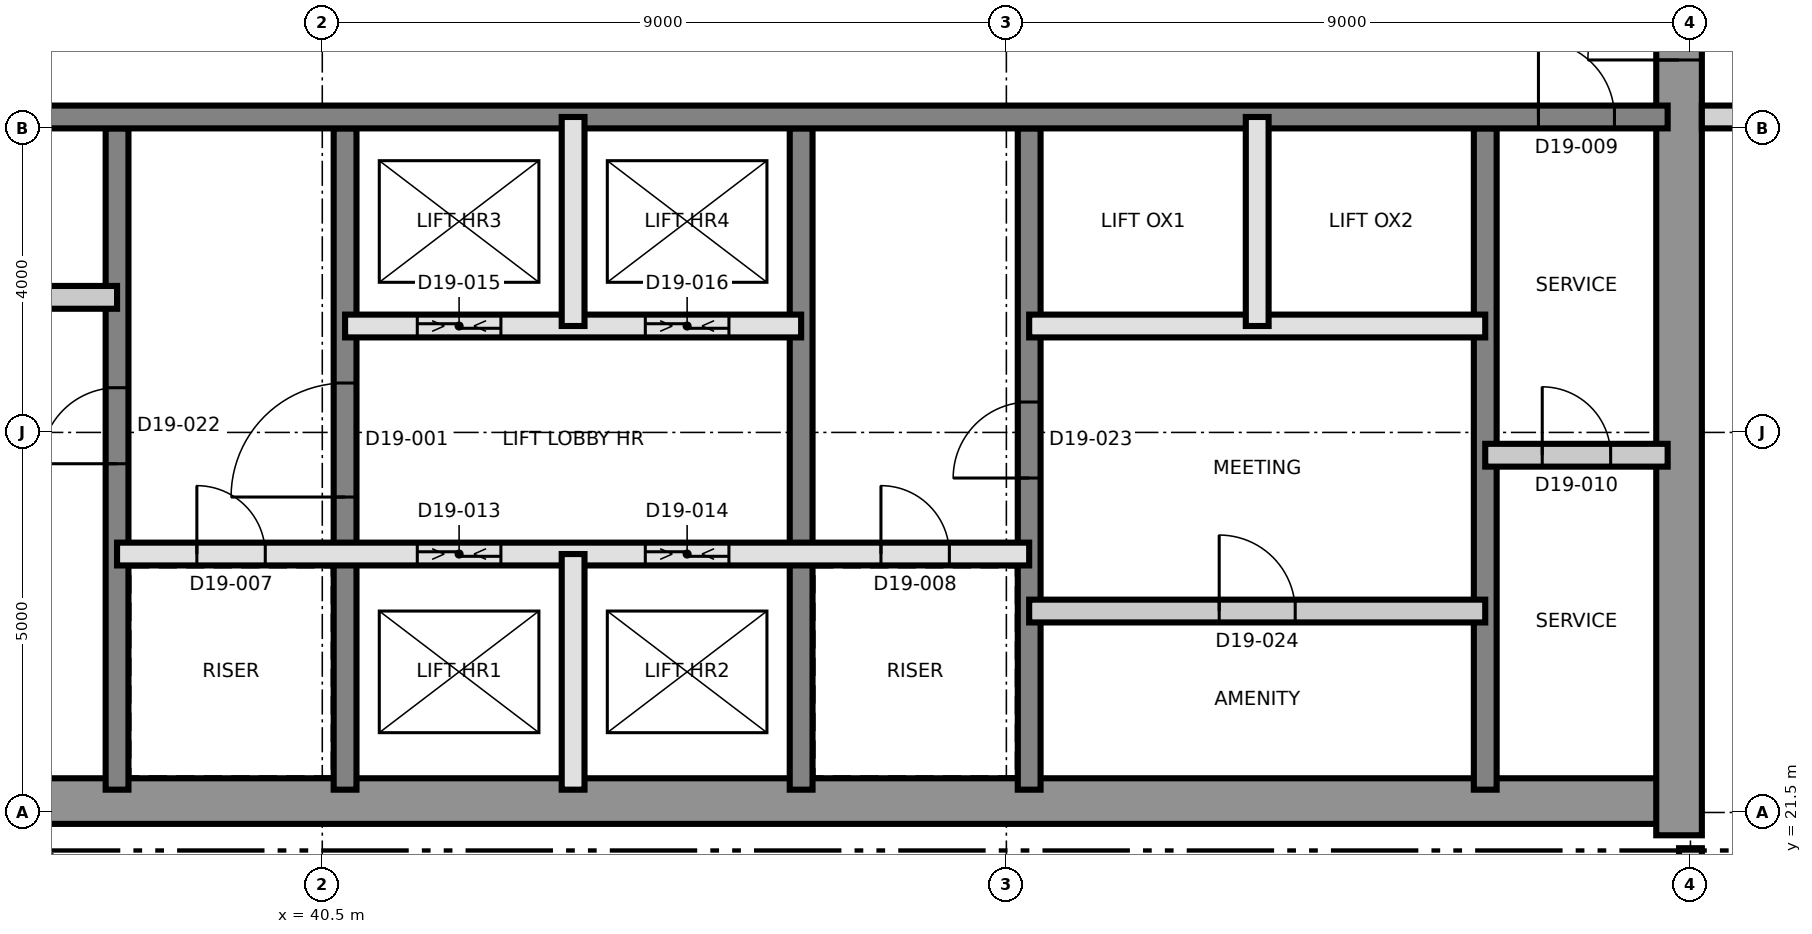
"""IFC4 building model, lengths in metres.
Left out: names, types, materials, properties, quantities, classifications, styles, units other than length and angle.
Written with IfcOpenShell. Run it as: python <this file> out.ifc"""

import sys

from ifc_helpers import new_model, si_unit, direction, frame, frame_2d, origin, place, context, subcontext, project, spatial, rectangle, extrude, element, fill, save


model = new_model("IFC4")
c1 = context("Model", 3, precision=1e-05, world=origin(), true_north=direction((0.0, 1.0)))
c2 = subcontext(c1, "Body", "Model", "MODEL_VIEW")
j1 = project(units=[si_unit("LENGTHUNIT", "METRE"), si_unit("PLANEANGLEUNIT", "RADIAN")], contexts=[c1])
p1 = place(None, origin())
s1 = spatial("IfcSite", under=j1, at=p1, CompositionType="ELEMENT")
p2 = place(p1, origin())
s2 = spatial("IfcBuilding", under=s1, at=p2, CompositionType="ELEMENT")
p3 = place(p2, frame((0.0, 0.0, 179.2)))
s3 = spatial("IfcBuildingStorey", under=s2, at=p3, CompositionType="ELEMENT", Elevation=179.2)
p4 = place(p3, frame((31.2, 21.65, 0.0), z_axis=(0.0, 0.0, 1.0), x_axis=(1.0, 0.0, 0.0)))
e1 = element("IfcWall", 1, at=p4, inside=s3, PredefinedType="SHEAR", context=c2, shape_type="SweptSolid", body=[
    extrude(rectangle(XDim=27.0, YDim=0.6, at=frame_2d((13.5, 0.0))), origin(), (0.0, 0.0, 1.0), 3.7),
])
p5 = place(p3, frame((58.35, 21.2, 0.0), z_axis=(0.0, 0.0, 1.0), x_axis=(0.0, 1.0, 0.0)))
e2 = element("IfcWall", 2, at=p5, inside=s3, PredefinedType="SHEAR", context=c2, shape_type="SweptSolid", body=[
    extrude(rectangle(XDim=18.6, YDim=0.6, at=frame_2d((9.3, 0.0))), origin(), (0.0, 0.0, 1.0), 3.7),
])
p6 = place(p5, frame((10.2, 0.0, 0.0)))
e3 = element("IfcOpeningElement", 3, at=p6, cuts=e2, PredefinedType="OPENING", context=c2, shape_type="SweptSolid", body=[
    extrude(rectangle(XDim=1.2, YDim=2.1, at=frame_2d((0.6, 1.05))), frame((0.0, 0.31, 0.0), z_axis=(0.0, -1.0, 0.0), x_axis=(1.0, 0.0, 0.0)), (0.0, 0.0, 1.0), 0.62),
])
p7 = place(p3, frame((37.8, 21.8, 0.0), z_axis=(0.0, 0.0, 1.0), x_axis=(0.0, 1.0, 0.0)))
e4 = element("IfcWall", 4, at=p7, inside=s3, PredefinedType="SHEAR", context=c2, shape_type="SweptSolid", body=[
    extrude(rectangle(XDim=8.7, YDim=0.3, at=frame_2d((4.35, 0.0))), origin(), (0.0, 0.0, 1.0), 3.7),
])
p8 = place(p7, frame((4.288, 0.0, 0.0)))
e5 = element("IfcOpeningElement", 5, at=p8, cuts=e4, PredefinedType="OPENING", context=c2, shape_type="SweptSolid", body=[
    extrude(rectangle(XDim=1.0, YDim=2.1, at=frame_2d((0.5, 1.05))), frame((0.0, 0.16, 0.0), z_axis=(0.0, -1.0, 0.0), x_axis=(1.0, 0.0, 0.0)), (0.0, 0.0, 1.0), 0.32),
])
p9 = place(p3, frame((40.8, 21.8, 0.0), z_axis=(0.0, 0.0, 1.0), x_axis=(0.0, 1.0, 0.0)))
e6 = element("IfcWall", 6, at=p9, inside=s3, PredefinedType="SHEAR", context=c2, shape_type="SweptSolid", body=[
    extrude(rectangle(XDim=8.7, YDim=0.3, at=frame_2d((4.35, 0.0))), origin(), (0.0, 0.0, 1.0), 3.7),
])
p10 = place(p9, frame((3.85, 0.0, 0.0)))
e7 = element("IfcOpeningElement", 7, at=p10, cuts=e6, PredefinedType="OPENING", context=c2, shape_type="SweptSolid", body=[
    extrude(rectangle(XDim=1.5, YDim=2.1, at=frame_2d((0.75, 1.05))), frame((0.0, 0.16, 0.0), z_axis=(0.0, -1.0, 0.0), x_axis=(1.0, 0.0, 0.0)), (0.0, 0.0, 1.0), 0.32),
])
p11 = place(p3, frame((46.8, 21.8, 0.0), z_axis=(0.0, 0.0, 1.0), x_axis=(0.0, 1.0, 0.0)))
e8 = element("IfcWall", 8, at=p11, inside=s3, PredefinedType="SHEAR", context=c2, shape_type="SweptSolid", body=[
    extrude(rectangle(XDim=8.7, YDim=0.3, at=frame_2d((4.35, 0.0))), origin(), (0.0, 0.0, 1.0), 3.7),
])
p12 = place(p3, frame((49.8, 21.8, 0.0), z_axis=(0.0, 0.0, 1.0), x_axis=(0.0, 1.0, 0.0)))
e9 = element("IfcWall", 9, at=p12, inside=s3, PredefinedType="SHEAR", context=c2, shape_type="SweptSolid", body=[
    extrude(rectangle(XDim=8.7, YDim=0.3, at=frame_2d((4.35, 0.0))), origin(), (0.0, 0.0, 1.0), 3.7),
])
p13 = place(p12, frame((4.1, 0.0, 0.0)))
e10 = element("IfcOpeningElement", 10, at=p13, cuts=e9, PredefinedType="OPENING", context=c2, shape_type="SweptSolid", body=[
    extrude(rectangle(XDim=1.0, YDim=2.1, at=frame_2d((0.5, 1.05))), frame((0.0, 0.16, 0.0), z_axis=(0.0, -1.0, 0.0), x_axis=(1.0, 0.0, 0.0)), (0.0, 0.0, 1.0), 0.32),
])
p14 = place(p3, frame((55.8, 21.8, 0.0), z_axis=(0.0, 0.0, 1.0), x_axis=(0.0, 1.0, 0.0)))
e11 = element("IfcWall", 11, at=p14, inside=s3, PredefinedType="SHEAR", context=c2, shape_type="SweptSolid", body=[
    extrude(rectangle(XDim=8.7, YDim=0.3, at=frame_2d((4.35, 0.0))), origin(), (0.0, 0.0, 1.0), 3.7),
])
p15 = place(p3, frame((31.8, 30.65, 0.0), z_axis=(0.0, 0.0, 1.0), x_axis=(1.0, 0.0, 0.0)))
e12 = element("IfcWall", 12, at=p15, inside=s3, PredefinedType="SHEAR", context=c2, shape_type="SweptSolid", body=[
    extrude(rectangle(XDim=26.4, YDim=0.3, at=frame_2d((13.2, 0.0))), origin(), (0.0, 0.0, 1.0), 3.7),
])
p16 = place(p15, frame((24.7, 0.0, 0.0)))
e13 = element("IfcOpeningElement", 13, at=p16, cuts=e12, PredefinedType="OPENING", context=c2, shape_type="SweptSolid", body=[
    extrude(rectangle(XDim=1.0, YDim=2.1, at=frame_2d((0.5, 1.05))), frame((0.0, 0.16, 0.0), z_axis=(0.0, -1.0, 0.0), x_axis=(1.0, 0.0, 0.0)), (0.0, 0.0, 1.0), 0.32),
])
p17 = place(p15, frame((4.0, 0.0, 0.0)))
e14 = element("IfcOpeningElement", 14, at=p17, cuts=e12, PredefinedType="OPENING", context=c2, shape_type="SweptSolid", body=[
    extrude(rectangle(XDim=1.0, YDim=2.1, at=frame_2d((0.5, 1.05))), frame((0.0, 0.16, 0.0), z_axis=(0.0, -1.0, 0.0), x_axis=(1.0, 0.0, 0.0)), (0.0, 0.0, 1.0), 0.32),
])
p18 = place(p3, frame((36.788, 20.834, 0.0), z_axis=(0.0, 0.0, 1.0), x_axis=(0.896857753975, -0.442319080682, 0.0)))
e15 = element("IfcWall", 15, at=p18, inside=s3, PredefinedType="SOLIDWALL", context=c2, shape_type="SweptSolid", body=[
    extrude(rectangle(XDim=1.618, YDim=0.3, at=frame_2d((0.809, 0.0))), origin(), (0.0, 0.0, 1.0), 3.4),
])
p19 = place(p3, frame((49.8, 24.15, 0.0), z_axis=(0.0, 0.0, 1.0), x_axis=(1.0, 0.0, 0.0)))
e16 = element("IfcWall", 16, at=p19, inside=s3, PredefinedType="PARTITIONING", context=c2, shape_type="SweptSolid", body=[
    extrude(rectangle(XDim=6.0, YDim=0.3, at=frame_2d((3.0, 0.0))), origin(), (0.0, 0.0, 1.0), 3.4),
])
p20 = place(p19, frame((2.5, 0.0, 0.0)))
e17 = element("IfcOpeningElement", 17, at=p20, cuts=e16, PredefinedType="OPENING", context=c2, shape_type="SweptSolid", body=[
    extrude(rectangle(XDim=1.0, YDim=2.1, at=frame_2d((0.5, 1.05))), frame((0.0, 0.16, 0.0), z_axis=(0.0, -1.0, 0.0), x_axis=(1.0, 0.0, 0.0)), (0.0, 0.0, 1.0), 0.32),
])
p21 = place(p3, frame((37.8, 24.9, 0.0), z_axis=(0.0, 0.0, 1.0), x_axis=(1.0, 0.0, 0.0)))
e18 = element("IfcWall", 18, at=p21, inside=s3, PredefinedType="SOLIDWALL", context=c2, shape_type="SweptSolid", body=[
    extrude(rectangle(XDim=12.0, YDim=0.3, at=frame_2d((6.0, 0.0))), origin(), (0.0, 0.0, 1.0), 3.4),
])
p22 = place(p21, frame((1.05, 0.0, 0.0)))
e19 = element("IfcOpeningElement", 19, at=p22, cuts=e18, PredefinedType="OPENING", context=c2, shape_type="SweptSolid", body=[
    extrude(rectangle(XDim=0.9, YDim=2.1, at=frame_2d((0.45, 1.05))), frame((0.0, 0.16, 0.0), z_axis=(0.0, -1.0, 0.0), x_axis=(1.0, 0.0, 0.0)), (0.0, 0.0, 1.0), 0.32),
])
p23 = place(p21, frame((10.05, 0.0, 0.0)))
e20 = element("IfcOpeningElement", 20, at=p23, cuts=e18, PredefinedType="OPENING", context=c2, shape_type="SweptSolid", body=[
    extrude(rectangle(XDim=0.9, YDim=2.1, at=frame_2d((0.45, 1.05))), frame((0.0, 0.16, 0.0), z_axis=(0.0, -1.0, 0.0), x_axis=(1.0, 0.0, 0.0)), (0.0, 0.0, 1.0), 0.32),
])
p24 = place(p21, frame((3.95, 0.0, 0.0)))
e21 = element("IfcOpeningElement", 21, at=p24, cuts=e18, PredefinedType="OPENING", context=c2, shape_type="SweptSolid", body=[
    extrude(rectangle(XDim=1.1, YDim=2.4, at=frame_2d((0.55, 1.2))), frame((0.0, 0.16, 0.0), z_axis=(0.0, -1.0, 0.0), x_axis=(1.0, 0.0, 0.0)), (0.0, 0.0, 1.0), 0.32),
])
p25 = place(p21, frame((6.95, 0.0, 0.0)))
e22 = element("IfcOpeningElement", 22, at=p25, cuts=e18, PredefinedType="OPENING", context=c2, shape_type="SweptSolid", body=[
    extrude(rectangle(XDim=1.1, YDim=2.4, at=frame_2d((0.55, 1.2))), frame((0.0, 0.16, 0.0), z_axis=(0.0, -1.0, 0.0), x_axis=(1.0, 0.0, 0.0)), (0.0, 0.0, 1.0), 0.32),
])
p26 = place(p3, frame((55.8, 26.2, 0.0), z_axis=(0.0, 0.0, 1.0), x_axis=(1.0, 0.0, 0.0)))
e23 = element("IfcWall", 23, at=p26, inside=s3, PredefinedType="PARTITIONING", context=c2, shape_type="SweptSolid", body=[
    extrude(rectangle(XDim=2.4, YDim=0.3, at=frame_2d((1.2, 0.0))), origin(), (0.0, 0.0, 1.0), 3.4),
])
p27 = place(p26, frame((0.75, 0.0, 0.0)))
e24 = element("IfcOpeningElement", 24, at=p27, cuts=e23, PredefinedType="OPENING", context=c2, shape_type="SweptSolid", body=[
    extrude(rectangle(XDim=0.9, YDim=2.1, at=frame_2d((0.45, 1.05))), frame((0.0, 0.16, 0.0), z_axis=(0.0, -1.0, 0.0), x_axis=(1.0, 0.0, 0.0)), (0.0, 0.0, 1.0), 0.32),
])
p28 = place(p3, frame((40.8, 27.9, 0.0), z_axis=(0.0, 0.0, 1.0), x_axis=(1.0, 0.0, 0.0)))
e25 = element("IfcWall", 25, at=p28, inside=s3, PredefinedType="SOLIDWALL", context=c2, shape_type="SweptSolid", body=[
    extrude(rectangle(XDim=6.0, YDim=0.3, at=frame_2d((3.0, 0.0))), origin(), (0.0, 0.0, 1.0), 3.4),
])
p29 = place(p28, frame((0.95, 0.0, 0.0)))
e26 = element("IfcOpeningElement", 26, at=p29, cuts=e25, PredefinedType="OPENING", context=c2, shape_type="SweptSolid", body=[
    extrude(rectangle(XDim=1.1, YDim=2.4, at=frame_2d((0.55, 1.2))), frame((0.0, 0.16, 0.0), z_axis=(0.0, -1.0, 0.0), x_axis=(1.0, 0.0, 0.0)), (0.0, 0.0, 1.0), 0.32),
])
p30 = place(p28, frame((3.95, 0.0, 0.0)))
e27 = element("IfcOpeningElement", 27, at=p30, cuts=e25, PredefinedType="OPENING", context=c2, shape_type="SweptSolid", body=[
    extrude(rectangle(XDim=1.1, YDim=2.4, at=frame_2d((0.55, 1.2))), frame((0.0, 0.16, 0.0), z_axis=(0.0, -1.0, 0.0), x_axis=(1.0, 0.0, 0.0)), (0.0, 0.0, 1.0), 0.32),
])
p31 = place(p3, frame((49.8, 27.9, 0.0), z_axis=(0.0, 0.0, 1.0), x_axis=(1.0, 0.0, 0.0)))
e28 = element("IfcWall", 28, at=p31, inside=s3, PredefinedType="SOLIDWALL", context=c2, shape_type="SweptSolid", body=[
    extrude(rectangle(XDim=6.0, YDim=0.3, at=frame_2d((3.0, 0.0))), origin(), (0.0, 0.0, 1.0), 3.4),
])
p32 = place(p3, frame((31.8, 28.277, 0.0), z_axis=(0.0, 0.0, 1.0), x_axis=(1.0, 0.0, 0.0)))
e29 = element("IfcWall", 29, at=p32, inside=s3, PredefinedType="PARTITIONING", context=c2, shape_type="SweptSolid", body=[
    extrude(rectangle(XDim=6.0, YDim=0.3, at=frame_2d((3.0, 0.0))), origin(), (0.0, 0.0, 1.0), 3.4),
])
p33 = place(p3, frame((43.8, 21.8, 0.0), z_axis=(0.0, 0.0, 1.0), x_axis=(0.0, 1.0, 0.0)))
e30 = element("IfcWall", 30, at=p33, inside=s3, PredefinedType="SOLIDWALL", context=c2, shape_type="SweptSolid", body=[
    extrude(rectangle(XDim=3.1, YDim=0.3, at=frame_2d((1.55, 0.0))), origin(), (0.0, 0.0, 1.0), 3.4),
])
for number, where, z_axis, x_axis in (
    (31, (43.8, 27.9, 0.0), (0.0, 0.0, 1.0), (0.0, 1.0, 0.0)),
    (32, (52.8, 27.9, 0.0), (0.0, 0.0, 1.0), (0.0, 1.0, 0.0)),
):
    element("IfcWall", number, at=place(p3, frame(where, z_axis=z_axis, x_axis=x_axis)), inside=s3, PredefinedType="SOLIDWALL", context=c2, shape_type="SweptSolid", body=[
        extrude(rectangle(XDim=2.75, YDim=0.3, at=frame_2d((1.375, 0.0))), origin(), (0.0, 0.0, 1.0), 3.4),
    ])
p34 = place(p3, frame((58.65, 30.65, 0.0), z_axis=(0.0, 0.0, 1.0), x_axis=(1.0, 0.0, 0.0)))
e33 = element("IfcWall", 33, at=p34, inside=s3, PredefinedType="PARTITIONING", context=c2, shape_type="SweptSolid", body=[
    extrude(rectangle(XDim=12.33, YDim=0.3, at=frame_2d((6.165, 0.0))), origin(), (0.0, 0.0, 1.0), 3.4),
])
p35 = place(p34, frame((0.985, 0.0, 0.0)))
e34 = element("IfcOpeningElement", 34, at=p35, cuts=e33, PredefinedType="OPENING", context=c2, shape_type="SweptSolid", body=[
    extrude(rectangle(XDim=1.2, YDim=2.1, at=frame_2d((0.6, 1.05))), frame((0.0, 0.16, 0.0), z_axis=(0.0, -1.0, 0.0), x_axis=(1.0, 0.0, 0.0)), (0.0, 0.0, 1.0), 0.32),
])
p36 = place(p34, frame((4.235, 0.0, 0.0)))
e35 = element("IfcOpeningElement", 35, at=p36, cuts=e33, PredefinedType="OPENING", context=c2, shape_type="SweptSolid", body=[
    extrude(rectangle(XDim=1.0, YDim=2.1, at=frame_2d((0.5, 1.05))), frame((0.0, 0.16, 0.0), z_axis=(0.0, -1.0, 0.0), x_axis=(1.0, 0.0, 0.0)), (0.0, 0.0, 1.0), 0.32),
])
p37 = place(p34, frame((9.985, 0.0, 0.0)))
e36 = element("IfcOpeningElement", 36, at=p37, cuts=e33, PredefinedType="OPENING", context=c2, shape_type="SweptSolid", body=[
    extrude(rectangle(XDim=1.2, YDim=2.1, at=frame_2d((0.6, 1.05))), frame((0.0, 0.16, 0.0), z_axis=(0.0, -1.0, 0.0), x_axis=(1.0, 0.0, 0.0)), (0.0, 0.0, 1.0), 0.32),
])
p38 = place(p3, frame((58.5, 19.17, 0.0), z_axis=(0.0, 0.0, 1.0), x_axis=(0.0, 1.0, 0.0)))
e37 = element("IfcWall", 37, at=p38, inside=s3, PredefinedType="PARTITIONING", context=c2, shape_type="SweptSolid", body=[
    extrude(rectangle(XDim=1.86, YDim=0.3, at=frame_2d((0.93, 0.0))), origin(), (0.0, 0.0, 1.0), 3.4),
])
p39 = place(p10, origin())
e38 = element("IfcDoor", 38, at=p39, inside=s3, OperationType="SINGLE_SWING_RIGHT", PredefinedType="DOOR", context=c2, shape_type="SweptSolid", body=[
    extrude(rectangle(XDim=1.5, YDim=2.1, at=frame_2d((0.75, 1.05))), frame((0.0, 0.025, 0.0), z_axis=(0.0, -1.0, 0.0), x_axis=(1.0, 0.0, 0.0)), (0.0, 0.0, 1.0), 0.05),
])
fill(e7, e38)
p40 = place(p22, origin())
e39 = element("IfcDoor", 39, at=p40, inside=s3, OperationType="SINGLE_SWING_LEFT", PredefinedType="DOOR", context=c2, shape_type="SweptSolid", body=[
    extrude(rectangle(XDim=0.9, YDim=2.1, at=frame_2d((0.45, 1.05))), frame((0.0, 0.025, 0.0), z_axis=(0.0, -1.0, 0.0), x_axis=(1.0, 0.0, 0.0)), (0.0, 0.0, 1.0), 0.05),
])
fill(e19, e39)
p41 = place(p23, origin())
e40 = element("IfcDoor", 40, at=p41, inside=s3, OperationType="SINGLE_SWING_RIGHT", PredefinedType="DOOR", context=c2, shape_type="SweptSolid", body=[
    extrude(rectangle(XDim=0.9, YDim=2.1, at=frame_2d((0.45, 1.05))), frame((0.0, 0.025, 0.0), z_axis=(0.0, -1.0, 0.0), x_axis=(1.0, 0.0, 0.0)), (0.0, 0.0, 1.0), 0.05),
])
fill(e20, e40)
p42 = place(p16, origin())
e41 = element("IfcDoor", 41, at=p42, inside=s3, OperationType="SINGLE_SWING_LEFT", PredefinedType="DOOR", context=c2, shape_type="SweptSolid", body=[
    extrude(rectangle(XDim=1.0, YDim=2.1, at=frame_2d((0.5, 1.05))), frame((0.0, 0.025, 0.0), z_axis=(0.0, -1.0, 0.0), x_axis=(1.0, 0.0, 0.0)), (0.0, 0.0, 1.0), 0.05),
])
fill(e13, e41)
p43 = place(p27, origin())
e42 = element("IfcDoor", 42, at=p43, inside=s3, OperationType="SINGLE_SWING_RIGHT", PredefinedType="DOOR", context=c2, shape_type="SweptSolid", body=[
    extrude(rectangle(XDim=0.9, YDim=2.1, at=frame_2d((0.45, 1.05))), frame((0.0, 0.025, 0.0), z_axis=(0.0, -1.0, 0.0), x_axis=(1.0, 0.0, 0.0)), (0.0, 0.0, 1.0), 0.05),
])
fill(e24, e42)
p44 = place(p6, origin())
e43 = element("IfcDoor", 43, at=p44, inside=s3, OperationType="SINGLE_SWING_LEFT", PredefinedType="DOOR", context=c2, shape_type="SweptSolid", body=[
    extrude(rectangle(XDim=1.2, YDim=2.1, at=frame_2d((0.6, 1.05))), frame((0.0, 0.025, 0.0), z_axis=(0.0, -1.0, 0.0), x_axis=(1.0, 0.0, 0.0)), (0.0, 0.0, 1.0), 0.05),
])
fill(e3, e43)
p45 = place(p24, origin())
e44 = element("IfcDoor", 44, at=p45, inside=s3, OperationType="SLIDING_TO_LEFT", PredefinedType="DOOR", context=c2, shape_type="SweptSolid", body=[
    extrude(rectangle(XDim=1.1, YDim=2.4, at=frame_2d((0.55, 1.2))), frame((0.0, 0.025, 0.0), z_axis=(0.0, -1.0, 0.0), x_axis=(1.0, 0.0, 0.0)), (0.0, 0.0, 1.0), 0.05),
])
fill(e21, e44)
p46 = place(p25, origin())
e45 = element("IfcDoor", 45, at=p46, inside=s3, OperationType="SLIDING_TO_LEFT", PredefinedType="DOOR", context=c2, shape_type="SweptSolid", body=[
    extrude(rectangle(XDim=1.1, YDim=2.4, at=frame_2d((0.55, 1.2))), frame((0.0, 0.025, 0.0), z_axis=(0.0, -1.0, 0.0), x_axis=(1.0, 0.0, 0.0)), (0.0, 0.0, 1.0), 0.05),
])
fill(e22, e45)
p47 = place(p29, origin())
e46 = element("IfcDoor", 46, at=p47, inside=s3, OperationType="SLIDING_TO_LEFT", PredefinedType="DOOR", context=c2, shape_type="SweptSolid", body=[
    extrude(rectangle(XDim=1.1, YDim=2.4, at=frame_2d((0.55, 1.2))), frame((0.0, 0.025, 0.0), z_axis=(0.0, -1.0, 0.0), x_axis=(1.0, 0.0, 0.0)), (0.0, 0.0, 1.0), 0.05),
])
fill(e26, e46)
p48 = place(p30, origin())
e47 = element("IfcDoor", 47, at=p48, inside=s3, OperationType="SLIDING_TO_LEFT", PredefinedType="DOOR", context=c2, shape_type="SweptSolid", body=[
    extrude(rectangle(XDim=1.1, YDim=2.4, at=frame_2d((0.55, 1.2))), frame((0.0, 0.025, 0.0), z_axis=(0.0, -1.0, 0.0), x_axis=(1.0, 0.0, 0.0)), (0.0, 0.0, 1.0), 0.05),
])
fill(e27, e47)
p49 = place(p8, origin())
e48 = element("IfcDoor", 48, at=p49, inside=s3, OperationType="SINGLE_SWING_RIGHT", PredefinedType="DOOR", context=c2, shape_type="SweptSolid", body=[
    extrude(rectangle(XDim=1.0, YDim=2.1, at=frame_2d((0.5, 1.05))), frame((0.0, 0.025, 0.0), z_axis=(0.0, -1.0, 0.0), x_axis=(1.0, 0.0, 0.0)), (0.0, 0.0, 1.0), 0.05),
])
fill(e5, e48)
p50 = place(p13, origin())
e49 = element("IfcDoor", 49, at=p50, inside=s3, OperationType="SINGLE_SWING_LEFT", PredefinedType="DOOR", context=c2, shape_type="SweptSolid", body=[
    extrude(rectangle(XDim=1.0, YDim=2.1, at=frame_2d((0.5, 1.05))), frame((0.0, 0.025, 0.0), z_axis=(0.0, -1.0, 0.0), x_axis=(1.0, 0.0, 0.0)), (0.0, 0.0, 1.0), 0.05),
])
fill(e10, e49)
p51 = place(p20, origin())
e50 = element("IfcDoor", 50, at=p51, inside=s3, OperationType="SINGLE_SWING_RIGHT", PredefinedType="DOOR", context=c2, shape_type="SweptSolid", body=[
    extrude(rectangle(XDim=1.0, YDim=2.1, at=frame_2d((0.5, 1.05))), frame((0.0, 0.025, 0.0), z_axis=(0.0, -1.0, 0.0), x_axis=(1.0, 0.0, 0.0)), (0.0, 0.0, 1.0), 0.05),
])
fill(e17, e50)
save(model, sys.argv[1])
